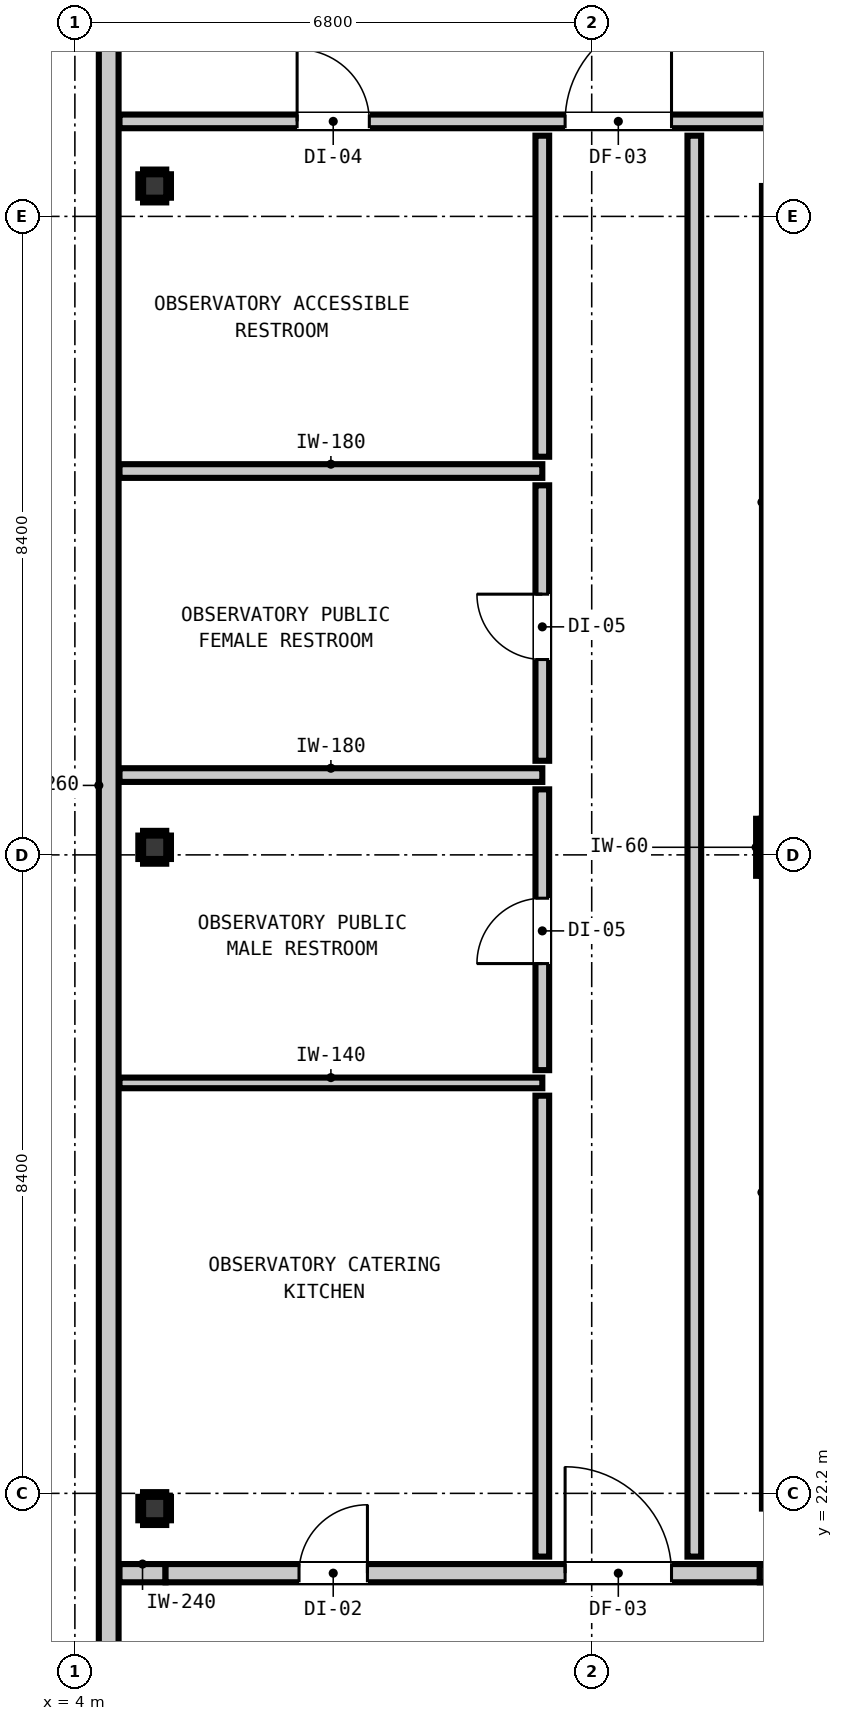
"""IFC4 building model, lengths in metres.
Left out: names, types, materials, properties, quantities, classifications, styles, units other than length and angle.
Written with IfcOpenShell. Run it as: python <this file> out.ifc"""

import sys

from ifc_helpers import new_model, si_unit, direction, frame, frame_2d, origin, origin_2d, place, context, subcontext, project, spatial, rectangle, i_section, extrude, element, fill, save


model = new_model("IFC4")
c1 = context("Model", 3, precision=1e-05, world=origin(), true_north=direction((0.0, 1.0)))
c2 = subcontext(c1, "Body", "Model", "MODEL_VIEW")
j1 = project(units=[si_unit("LENGTHUNIT", "METRE"), si_unit("PLANEANGLEUNIT", "RADIAN")], contexts=[c1])
p1 = place(None, origin())
s1 = spatial("IfcSite", under=j1, at=p1, CompositionType="ELEMENT")
p2 = place(p1, origin())
s2 = spatial("IfcBuilding", under=s1, at=p2, CompositionType="ELEMENT")
p3 = place(p2, frame((0.0, 0.0, 268.88)))
s3 = spatial("IfcBuildingStorey", under=s2, at=p3, CompositionType="ELEMENT", Elevation=268.88)
p4 = place(p3, frame((13.4, 30.7, 0.0), z_axis=(0.0, 0.0, 1.0), x_axis=(1.0, 0.0, 0.0)))
e1 = element("IfcColumn", 1, at=p4, inside=s3, PredefinedType="COLUMN", context=c2, shape_type="SweptSolid", body=[
    extrude(rectangle(XDim=0.75, YDim=0.75, at=origin_2d()), origin(), (0.0, 0.0, 1.0), 4.6),
])
p5 = place(p3, frame((13.44, 22.0, 0.0), z_axis=(0.0, 0.0, 1.0), x_axis=(0.0, 1.0, 0.0)))
e2 = element("IfcWall", 2, at=p5, inside=s3, PredefinedType="SHEAR", context=c2, shape_type="SweptSolid", body=[
    extrude(rectangle(XDim=8.32, YDim=0.8, at=frame_2d((4.16, 0.0))), origin(), (0.0, 0.0, 1.0), 4.6),
])
p6 = place(p3, frame((13.44, 31.08, 0.0), z_axis=(0.0, 0.0, 1.0), x_axis=(0.0, 1.0, 0.0)))
e3 = element("IfcWall", 3, at=p6, inside=s3, PredefinedType="SHEAR", context=c2, shape_type="SweptSolid", body=[
    extrude(rectangle(XDim=8.32, YDim=0.8, at=frame_2d((4.16, 0.0))), origin(), (0.0, 0.0, 1.0), 4.6),
])
for number, where, z_axis, x_axis in (
    (4, (5.05, 22.0, 0.0), (0.0, 0.0, 1.0), (1.0, 0.0, 0.0)),
    (5, (5.05, 30.7, 0.0), (0.0, 0.0, 1.0), (1.0, 0.0, 0.0)),
    (6, (5.05, 39.4, 0.0), (0.0, 0.0, 1.0), (1.0, 0.0, 0.0)),
):
    element("IfcColumn", number, at=place(p3, frame(where, z_axis=z_axis, x_axis=x_axis)), inside=s3, PredefinedType="COLUMN", context=c2, shape_type="SweptSolid", body=[
        extrude(i_section(OverallWidth=0.305, OverallDepth=0.308, WebThickness=0.01, FlangeThickness=0.015, at=origin_2d()), origin(), (0.0, 0.0, 1.0), 4.6),
    ])
p7 = place(p3, frame((4.445, 18.545, 0.0), z_axis=(0.0, 0.0, 1.0), x_axis=(0.0, 1.0, 0.0)))
e7 = element("IfcWall", 7, at=p7, inside=s3, PredefinedType="STANDARD", context=c2, shape_type="SweptSolid", body=[
    extrude(rectangle(XDim=30.31, YDim=0.26, at=frame_2d((15.155, 0.0))), origin(), (0.0, 0.0, 1.0), 4.38),
])
p8 = place(p7, frame((26.038, 0.0, 0.85)))
e8 = element("IfcOpeningElement", 8, at=p8, cuts=e7, PredefinedType="OPENING", context=c2, shape_type="SweptSolid", body=[
    extrude(rectangle(XDim=1.65, YDim=1.75, at=frame_2d((0.825, 0.875))), frame((0.0, 0.14, 0.0), z_axis=(0.0, -1.0, 0.0), x_axis=(1.0, 0.0, 0.0)), (0.0, 0.0, 1.0), 0.28),
])
p9 = place(p3, frame((4.587, 21.15, 0.0), z_axis=(0.0, 0.0, 1.0), x_axis=(1.0, 0.0, 0.0)))
e9 = element("IfcWall", 9, at=p9, inside=s3, PredefinedType="PARTITIONING", context=c2, shape_type="SweptSolid", body=[
    extrude(rectangle(XDim=0.606, YDim=0.24, at=frame_2d((0.303, 0.0))), origin(), (0.0, 0.0, 1.0), 4.38),
])
p10 = place(p3, frame((5.193, 21.15, 0.0), z_axis=(0.0, 0.0, 1.0), x_axis=(1.0, 0.0, 0.0)))
e10 = element("IfcWall", 10, at=p10, inside=s3, PredefinedType="PARTITIONING", context=c2, shape_type="SweptSolid", body=[
    extrude(rectangle(XDim=7.819, YDim=0.24, at=frame_2d((3.909, 0.0))), origin(), (0.0, 0.0, 1.0), 3.757),
])
p11 = place(p10, frame((5.257, 0.0, 0.0)))
e11 = element("IfcOpeningElement", 11, at=p11, cuts=e10, PredefinedType="OPENING", context=c2, shape_type="SweptSolid", body=[
    extrude(rectangle(XDim=1.4, YDim=2.15, at=frame_2d((0.7, 1.075))), frame((0.0, 0.13, 0.0), z_axis=(0.0, -1.0, 0.0), x_axis=(1.0, 0.0, 0.0)), (0.0, 0.0, 1.0), 0.26),
])
p12 = place(p10, frame((1.756, 0.0, 0.0)))
e12 = element("IfcOpeningElement", 12, at=p12, cuts=e10, PredefinedType="OPENING", context=c2, shape_type="SweptSolid", body=[
    extrude(rectangle(XDim=0.9, YDim=2.1, at=frame_2d((0.45, 1.05))), frame((0.0, 0.13, 0.0), z_axis=(0.0, -1.0, 0.0), x_axis=(1.0, 0.0, 0.0)), (0.0, 0.0, 1.0), 0.26),
])
p13 = place(p3, frame((13.012, 21.15, 0.0), z_axis=(0.0, 0.0, 1.0), x_axis=(1.0, 0.0, 0.0)))
e13 = element("IfcWall", 13, at=p13, inside=s3, PredefinedType="PARTITIONING", context=c2, shape_type="SweptSolid", body=[
    extrude(rectangle(XDim=28.201, YDim=0.24, at=frame_2d((14.101, 0.0))), origin(), (0.0, 0.0, 1.0), 4.38),
])
p14 = place(p13, frame((5.198, 0.0, 0.0)))
e14 = element("IfcOpeningElement", 14, at=p14, cuts=e13, PredefinedType="OPENING", context=c2, shape_type="SweptSolid", body=[
    extrude(rectangle(XDim=1.1, YDim=2.15, at=frame_2d((0.55, 1.075))), frame((0.0, 0.13, 0.0), z_axis=(0.0, -1.0, 0.0), x_axis=(1.0, 0.0, 0.0)), (0.0, 0.0, 1.0), 0.26),
])
p15 = place(p13, frame((25.989, 0.0, 0.0)))
e15 = element("IfcOpeningElement", 15, at=p15, cuts=e13, PredefinedType="OPENING", context=c2, shape_type="SweptSolid", body=[
    extrude(rectangle(XDim=0.9, YDim=2.1, at=frame_2d((0.45, 1.05))), frame((0.0, 0.13, 0.0), z_axis=(0.0, -1.0, 0.0), x_axis=(1.0, 0.0, 0.0)), (0.0, 0.0, 1.0), 0.26),
])
for number, where, z_axis, x_axis in (
    (16, (4.587, 31.65, 0.0), (0.0, 0.0, 1.0), (1.0, 0.0, 0.0)),
    (17, (4.587, 35.65, 0.0), (0.0, 0.0, 1.0), (1.0, 0.0, 0.0)),
):
    element("IfcWall", number, at=place(p3, frame(where, z_axis=z_axis, x_axis=x_axis)), inside=s3, PredefinedType="PARTITIONING", context=c2, shape_type="SweptSolid", body=[
        extrude(rectangle(XDim=5.563, YDim=0.18, at=frame_2d((2.781, 0.0))), origin(), (0.0, 0.0, 1.0), 4.38),
    ])
p16 = place(p3, frame((4.587, 40.25, 0.0), z_axis=(0.0, 0.0, 1.0), x_axis=(1.0, 0.0, 0.0)))
e18 = element("IfcWall", 18, at=p16, inside=s3, PredefinedType="PARTITIONING", context=c2, shape_type="SweptSolid", body=[
    extrude(rectangle(XDim=36.626, YDim=0.18, at=frame_2d((18.313, 0.0))), origin(), (0.0, 0.0, 1.0), 4.38),
])
p17 = place(p16, frame((12.848, 0.0, 0.0)))
e19 = element("IfcOpeningElement", 19, at=p17, cuts=e18, PredefinedType="OPENING", context=c2, shape_type="SweptSolid", body=[
    extrude(rectangle(XDim=1.4, YDim=2.15, at=frame_2d((0.7, 1.075))), frame((0.0, 0.1, 0.0), z_axis=(0.0, -1.0, 0.0), x_axis=(1.0, 0.0, 0.0)), (0.0, 0.0, 1.0), 0.2),
])
p18 = place(p16, frame((5.863, 0.0, 0.0)))
e20 = element("IfcOpeningElement", 20, at=p18, cuts=e18, PredefinedType="OPENING", context=c2, shape_type="SweptSolid", body=[
    extrude(rectangle(XDim=1.4, YDim=2.15, at=frame_2d((0.7, 1.075))), frame((0.0, 0.1, 0.0), z_axis=(0.0, -1.0, 0.0), x_axis=(1.0, 0.0, 0.0)), (0.0, 0.0, 1.0), 0.2),
])
p19 = place(p16, frame((2.337, 0.0, 0.0)))
e21 = element("IfcOpeningElement", 21, at=p19, cuts=e18, PredefinedType="OPENING", context=c2, shape_type="SweptSolid", body=[
    extrude(rectangle(XDim=0.95, YDim=2.1, at=frame_2d((0.475, 1.05))), frame((0.0, 0.1, 0.0), z_axis=(0.0, -1.0, 0.0), x_axis=(1.0, 0.0, 0.0)), (0.0, 0.0, 1.0), 0.2),
])
p20 = place(p16, frame((34.414, 0.0, 0.0)))
e22 = element("IfcOpeningElement", 22, at=p20, cuts=e18, PredefinedType="OPENING", context=c2, shape_type="SweptSolid", body=[
    extrude(rectangle(XDim=0.9, YDim=2.1, at=frame_2d((0.45, 1.05))), frame((0.0, 0.1, 0.0), z_axis=(0.0, -1.0, 0.0), x_axis=(1.0, 0.0, 0.0)), (0.0, 0.0, 1.0), 0.2),
])
p21 = place(p3, frame((4.587, 27.6, 0.0), z_axis=(0.0, 0.0, 1.0), x_axis=(1.0, 0.0, 0.0)))
e23 = element("IfcWall", 23, at=p21, inside=s3, PredefinedType="PARTITIONING", context=c2, shape_type="SweptSolid", body=[
    extrude(rectangle(XDim=5.563, YDim=0.14, at=frame_2d((2.781, 0.0))), origin(), (0.0, 0.0, 1.0), 4.38),
])
p22 = place(p3, frame((10.15, 21.368, 0.0), z_axis=(0.0, 0.0, 1.0), x_axis=(0.0, 1.0, 0.0)))
e24 = element("IfcWall", 24, at=p22, inside=s3, PredefinedType="PARTITIONING", context=c2, shape_type="SweptSolid", body=[
    extrude(rectangle(XDim=6.064, YDim=0.18, at=frame_2d((3.032, 0.0))), origin(), (0.0, 0.0, 1.0), 4.38),
])
p23 = place(p3, frame((10.15, 27.768, 0.0), z_axis=(0.0, 0.0, 1.0), x_axis=(0.0, 1.0, 0.0)))
e25 = element("IfcWall", 25, at=p23, inside=s3, PredefinedType="PARTITIONING", context=c2, shape_type="SweptSolid", body=[
    extrude(rectangle(XDim=3.694, YDim=0.18, at=frame_2d((1.847, 0.0))), origin(), (0.0, 0.0, 1.0), 4.38),
])
p24 = place(p23, frame((1.402, 0.0, 0.0)))
e26 = element("IfcOpeningElement", 26, at=p24, cuts=e25, PredefinedType="OPENING", context=c2, shape_type="SweptSolid", body=[
    extrude(rectangle(XDim=0.86, YDim=2.02, at=frame_2d((0.43, 1.01))), frame((0.0, 0.1, 0.0), z_axis=(0.0, -1.0, 0.0), x_axis=(1.0, 0.0, 0.0)), (0.0, 0.0, 1.0), 0.2),
])
p25 = place(p3, frame((10.15, 31.838, 0.0), z_axis=(0.0, 0.0, 1.0), x_axis=(0.0, 1.0, 0.0)))
e27 = element("IfcWall", 27, at=p25, inside=s3, PredefinedType="PARTITIONING", context=c2, shape_type="SweptSolid", body=[
    extrude(rectangle(XDim=3.624, YDim=0.18, at=frame_2d((1.812, 0.0))), origin(), (0.0, 0.0, 1.0), 4.38),
])
p26 = place(p25, frame((1.332, 0.0, 0.0)))
e28 = element("IfcOpeningElement", 28, at=p26, cuts=e27, PredefinedType="OPENING", context=c2, shape_type="SweptSolid", body=[
    extrude(rectangle(XDim=0.86, YDim=2.02, at=frame_2d((0.43, 1.01))), frame((0.0, 0.1, 0.0), z_axis=(0.0, -1.0, 0.0), x_axis=(1.0, 0.0, 0.0)), (0.0, 0.0, 1.0), 0.2),
])
p27 = place(p3, frame((10.15, 35.838, 0.0), z_axis=(0.0, 0.0, 1.0), x_axis=(0.0, 1.0, 0.0)))
e29 = element("IfcWall", 29, at=p27, inside=s3, PredefinedType="PARTITIONING", context=c2, shape_type="SweptSolid", body=[
    extrude(rectangle(XDim=4.224, YDim=0.18, at=frame_2d((2.112, 0.0))), origin(), (0.0, 0.0, 1.0), 4.38),
])
p28 = place(p3, frame((12.15, 21.368, 0.0), z_axis=(0.0, 0.0, 1.0), x_axis=(0.0, 1.0, 0.0)))
e30 = element("IfcWall", 30, at=p28, inside=s3, PredefinedType="PARTITIONING", context=c2, shape_type="SweptSolid", body=[
    extrude(rectangle(XDim=18.694, YDim=0.18, at=frame_2d((9.347, 0.0))), origin(), (0.0, 0.0, 1.0), 4.38),
])
p29 = place(p3, frame((12.993, 30.325, 0.0), z_axis=(0.0, 0.0, 1.0), x_axis=(0.0, 1.0, 0.0)))
e31 = element("IfcWall", 31, at=p29, inside=s3, PredefinedType="PARTITIONING", context=c2, shape_type="SweptSolid", body=[
    extrude(rectangle(XDim=0.75, YDim=0.06, at=frame_2d((0.375, 0.0))), origin(), (0.0, 0.0, 1.0), 1.45),
])
for number, where, z_axis, x_axis in (
    (32, (4.897, 21.814, 0.0), (0.0, 0.0, 1.0), (1.0, 0.0, 0.0)),
    (33, (4.897, 22.186, 0.0), (0.0, 0.0, 1.0), (1.0, 0.0, 0.0)),
):
    element("IfcWall", number, at=place(p3, frame(where, z_axis=z_axis, x_axis=x_axis)), inside=s3, PredefinedType="PARTITIONING", context=c2, shape_type="SweptSolid", body=[
        extrude(rectangle(XDim=0.305, YDim=0.06, at=frame_2d((0.152, 0.0))), origin(), (0.0, 0.0, 1.0), 1.45),
    ])
for number, where, z_axis, x_axis in (
    (34, (4.865, 21.846, 0.0), (0.0, 0.0, 1.0), (0.0, 1.0, 0.0)),
    (35, (5.234, 21.846, 0.0), (0.0, 0.0, 1.0), (0.0, 1.0, 0.0)),
):
    element("IfcWall", number, at=place(p3, frame(where, z_axis=z_axis, x_axis=x_axis)), inside=s3, PredefinedType="PARTITIONING", context=c2, shape_type="SweptSolid", body=[
        extrude(rectangle(XDim=0.308, YDim=0.06, at=frame_2d((0.154, 0.0))), origin(), (0.0, 0.0, 1.0), 1.45),
    ])
for number, where, z_axis, x_axis in (
    (36, (4.897, 30.514, 0.0), (0.0, 0.0, 1.0), (1.0, 0.0, 0.0)),
    (37, (4.897, 30.886, 0.0), (0.0, 0.0, 1.0), (1.0, 0.0, 0.0)),
):
    element("IfcWall", number, at=place(p3, frame(where, z_axis=z_axis, x_axis=x_axis)), inside=s3, PredefinedType="PARTITIONING", context=c2, shape_type="SweptSolid", body=[
        extrude(rectangle(XDim=0.305, YDim=0.06, at=frame_2d((0.152, 0.0))), origin(), (0.0, 0.0, 1.0), 1.45),
    ])
for number, where, z_axis, x_axis in (
    (38, (4.865, 30.546, 0.0), (0.0, 0.0, 1.0), (0.0, 1.0, 0.0)),
    (39, (5.234, 30.546, 0.0), (0.0, 0.0, 1.0), (0.0, 1.0, 0.0)),
):
    element("IfcWall", number, at=place(p3, frame(where, z_axis=z_axis, x_axis=x_axis)), inside=s3, PredefinedType="PARTITIONING", context=c2, shape_type="SweptSolid", body=[
        extrude(rectangle(XDim=0.308, YDim=0.06, at=frame_2d((0.154, 0.0))), origin(), (0.0, 0.0, 1.0), 1.45),
    ])
for number, where, z_axis, x_axis in (
    (40, (4.897, 39.214, 0.0), (0.0, 0.0, 1.0), (1.0, 0.0, 0.0)),
    (41, (4.897, 39.586, 0.0), (0.0, 0.0, 1.0), (1.0, 0.0, 0.0)),
):
    element("IfcWall", number, at=place(p3, frame(where, z_axis=z_axis, x_axis=x_axis)), inside=s3, PredefinedType="PARTITIONING", context=c2, shape_type="SweptSolid", body=[
        extrude(rectangle(XDim=0.305, YDim=0.06, at=frame_2d((0.152, 0.0))), origin(), (0.0, 0.0, 1.0), 1.45),
    ])
for number, where, z_axis, x_axis in (
    (42, (4.865, 39.246, 0.0), (0.0, 0.0, 1.0), (0.0, 1.0, 0.0)),
    (43, (5.234, 39.246, 0.0), (0.0, 0.0, 1.0), (0.0, 1.0, 0.0)),
):
    element("IfcWall", number, at=place(p3, frame(where, z_axis=z_axis, x_axis=x_axis)), inside=s3, PredefinedType="PARTITIONING", context=c2, shape_type="SweptSolid", body=[
        extrude(rectangle(XDim=0.308, YDim=0.06, at=frame_2d((0.154, 0.0))), origin(), (0.0, 0.0, 1.0), 1.45),
    ])
p30 = place(p18, origin())
e44 = element("IfcDoor", 44, at=p30, inside=s3, OperationType="SINGLE_SWING_RIGHT", PredefinedType="DOOR", context=c2, shape_type="SweptSolid", body=[
    extrude(rectangle(XDim=1.4, YDim=2.15, at=frame_2d((0.7, 1.075))), frame((0.0, 0.025, 0.0), z_axis=(0.0, -1.0, 0.0), x_axis=(1.0, 0.0, 0.0)), (0.0, 0.0, 1.0), 0.05),
])
fill(e20, e44)
p31 = place(p11, origin())
e45 = element("IfcDoor", 45, at=p31, inside=s3, OperationType="SINGLE_SWING_LEFT", PredefinedType="DOOR", context=c2, shape_type="SweptSolid", body=[
    extrude(rectangle(XDim=1.4, YDim=2.15, at=frame_2d((0.7, 1.075))), frame((0.0, 0.025, 0.0), z_axis=(0.0, -1.0, 0.0), x_axis=(1.0, 0.0, 0.0)), (0.0, 0.0, 1.0), 0.05),
])
fill(e11, e45)
p32 = place(p12, origin())
e46 = element("IfcDoor", 46, at=p32, inside=s3, OperationType="SINGLE_SWING_RIGHT", PredefinedType="DOOR", context=c2, shape_type="SweptSolid", body=[
    extrude(rectangle(XDim=0.9, YDim=2.1, at=frame_2d((0.45, 1.05))), frame((0.0, 0.025, 0.0), z_axis=(0.0, -1.0, 0.0), x_axis=(1.0, 0.0, 0.0)), (0.0, 0.0, 1.0), 0.05),
])
fill(e12, e46)
p33 = place(p24, origin())
e47 = element("IfcDoor", 47, at=p33, inside=s3, OperationType="SINGLE_SWING_LEFT", PredefinedType="DOOR", context=c2, shape_type="SweptSolid", body=[
    extrude(rectangle(XDim=0.86, YDim=2.02, at=frame_2d((0.43, 1.01))), frame((0.0, 0.025, 0.0), z_axis=(0.0, -1.0, 0.0), x_axis=(1.0, 0.0, 0.0)), (0.0, 0.0, 1.0), 0.05),
])
fill(e26, e47)
p34 = place(p26, origin())
e48 = element("IfcDoor", 48, at=p34, inside=s3, OperationType="SINGLE_SWING_RIGHT", PredefinedType="DOOR", context=c2, shape_type="SweptSolid", body=[
    extrude(rectangle(XDim=0.86, YDim=2.02, at=frame_2d((0.43, 1.01))), frame((0.0, 0.025, 0.0), z_axis=(0.0, -1.0, 0.0), x_axis=(1.0, 0.0, 0.0)), (0.0, 0.0, 1.0), 0.05),
])
fill(e28, e48)
p35 = place(p19, origin())
e49 = element("IfcDoor", 49, at=p35, inside=s3, OperationType="SINGLE_SWING_LEFT", PredefinedType="DOOR", context=c2, shape_type="SweptSolid", body=[
    extrude(rectangle(XDim=0.95, YDim=2.1, at=frame_2d((0.475, 1.05))), frame((0.0, 0.025, 0.0), z_axis=(0.0, -1.0, 0.0), x_axis=(1.0, 0.0, 0.0)), (0.0, 0.0, 1.0), 0.05),
])
fill(e21, e49)
save(model, sys.argv[1])
